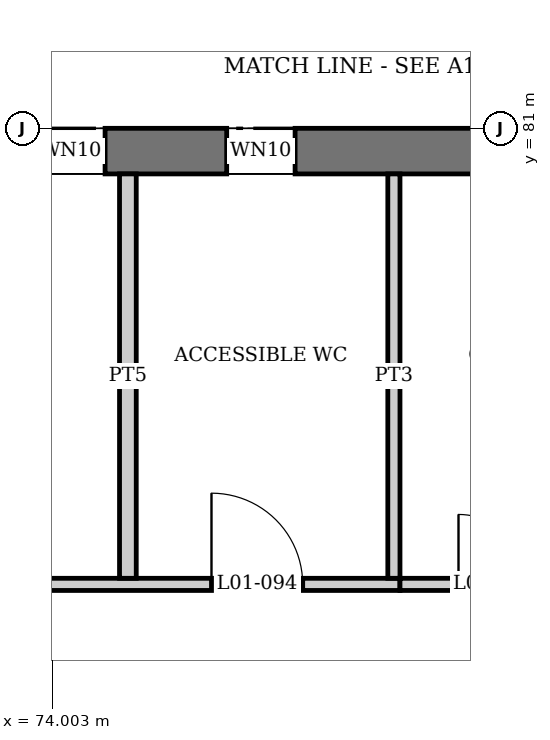
"""IFC4 building model, lengths in metres.
Left out: names, types, materials, properties, quantities, classifications, styles, units other than length and angle.
Written with IfcOpenShell. Run it as: python <this file> out.ifc"""

import sys

from ifc_helpers import new_model, si_unit, direction, frame, frame_2d, origin, place, context, subcontext, project, spatial, rectangle, extrude, element, fill, save


model = new_model("IFC4")
c1 = context("Model", 3, precision=1e-05, world=origin(), true_north=direction((0.0, 1.0)))
c2 = subcontext(c1, "Body", "Model", "MODEL_VIEW")
j1 = project(units=[si_unit("LENGTHUNIT", "METRE"), si_unit("PLANEANGLEUNIT", "RADIAN")], contexts=[c1])
p1 = place(None, origin())
s1 = spatial("IfcSite", under=j1, at=p1, CompositionType="ELEMENT")
p2 = place(p1, origin())
s2 = spatial("IfcBuilding", under=s1, at=p2, CompositionType="ELEMENT")
p3 = place(p2, frame((0.0, 0.0, 6.0)))
s3 = spatial("IfcBuildingStorey", under=s2, at=p3, CompositionType="ELEMENT", Elevation=6.0)
p4 = place(p3, frame((0.0, 80.7, 0.0), z_axis=(0.0, 0.0, 1.0), x_axis=(1.0, 0.0, 0.0)))
e1 = element("IfcWall", 1, at=p4, inside=s3, PredefinedType="SHEAR", context=c2, shape_type="SweptSolid", body=[
    extrude(rectangle(XDim=180.0, YDim=0.6, at=frame_2d((90.0, 0.0))), origin(), (0.0, 0.0, 1.0), 4.5),
])
p5 = place(p4, frame((0.9, 0.0, 0.6)))
e2 = element("IfcOpeningElement", 2, at=p5, cuts=e1, PredefinedType="OPENING", context=c2, shape_type="SweptSolid", body=[
    extrude(rectangle(XDim=2.7, YDim=2.7, at=frame_2d((1.35, 1.35))), frame((0.0, 0.31, 0.0), z_axis=(0.0, -1.0, 0.0), x_axis=(1.0, 0.0, 0.0)), (0.0, 0.0, 1.0), 0.62),
])
p6 = place(p4, frame((5.4, 0.0, 0.6)))
e3 = element("IfcOpeningElement", 3, at=p6, cuts=e1, PredefinedType="OPENING", context=c2, shape_type="SweptSolid", body=[
    extrude(rectangle(XDim=2.7, YDim=2.7, at=frame_2d((1.35, 1.35))), frame((0.0, 0.31, 0.0), z_axis=(0.0, -1.0, 0.0), x_axis=(1.0, 0.0, 0.0)), (0.0, 0.0, 1.0), 0.62),
])
p7 = place(p4, frame((9.9, 0.0, 0.6)))
e4 = element("IfcOpeningElement", 4, at=p7, cuts=e1, PredefinedType="OPENING", context=c2, shape_type="SweptSolid", body=[
    extrude(rectangle(XDim=2.7, YDim=2.7, at=frame_2d((1.35, 1.35))), frame((0.0, 0.31, 0.0), z_axis=(0.0, -1.0, 0.0), x_axis=(1.0, 0.0, 0.0)), (0.0, 0.0, 1.0), 0.62),
])
p8 = place(p4, frame((14.4, 0.0, 0.6)))
e5 = element("IfcOpeningElement", 5, at=p8, cuts=e1, PredefinedType="OPENING", context=c2, shape_type="SweptSolid", body=[
    extrude(rectangle(XDim=2.7, YDim=2.7, at=frame_2d((1.35, 1.35))), frame((0.0, 0.31, 0.0), z_axis=(0.0, -1.0, 0.0), x_axis=(1.0, 0.0, 0.0)), (0.0, 0.0, 1.0), 0.62),
])
p9 = place(p4, frame((18.9, 0.0, 0.6)))
e6 = element("IfcOpeningElement", 6, at=p9, cuts=e1, PredefinedType="OPENING", context=c2, shape_type="SweptSolid", body=[
    extrude(rectangle(XDim=2.7, YDim=2.7, at=frame_2d((1.35, 1.35))), frame((0.0, 0.31, 0.0), z_axis=(0.0, -1.0, 0.0), x_axis=(1.0, 0.0, 0.0)), (0.0, 0.0, 1.0), 0.62),
])
p10 = place(p4, frame((23.4, 0.0, 0.6)))
e7 = element("IfcOpeningElement", 7, at=p10, cuts=e1, PredefinedType="OPENING", context=c2, shape_type="SweptSolid", body=[
    extrude(rectangle(XDim=2.7, YDim=2.7, at=frame_2d((1.35, 1.35))), frame((0.0, 0.31, 0.0), z_axis=(0.0, -1.0, 0.0), x_axis=(1.0, 0.0, 0.0)), (0.0, 0.0, 1.0), 0.62),
])
p11 = place(p4, frame((37.05, 0.0, 0.9)))
e8 = element("IfcOpeningElement", 8, at=p11, cuts=e1, PredefinedType="OPENING", context=c2, shape_type="SweptSolid", body=[
    extrude(rectangle(XDim=2.4, YDim=2.1, at=frame_2d((1.2, 1.05))), frame((0.0, 0.31, 0.0), z_axis=(0.0, -1.0, 0.0), x_axis=(1.0, 0.0, 0.0)), (0.0, 0.0, 1.0), 0.62),
])
p12 = place(p4, frame((41.55, 0.0, 0.9)))
e9 = element("IfcOpeningElement", 9, at=p12, cuts=e1, PredefinedType="OPENING", context=c2, shape_type="SweptSolid", body=[
    extrude(rectangle(XDim=2.4, YDim=2.1, at=frame_2d((1.2, 1.05))), frame((0.0, 0.31, 0.0), z_axis=(0.0, -1.0, 0.0), x_axis=(1.0, 0.0, 0.0)), (0.0, 0.0, 1.0), 0.62),
])
p13 = place(p4, frame((46.05, 0.0, 0.9)))
e10 = element("IfcOpeningElement", 10, at=p13, cuts=e1, PredefinedType="OPENING", context=c2, shape_type="SweptSolid", body=[
    extrude(rectangle(XDim=2.4, YDim=2.1, at=frame_2d((1.2, 1.05))), frame((0.0, 0.31, 0.0), z_axis=(0.0, -1.0, 0.0), x_axis=(1.0, 0.0, 0.0)), (0.0, 0.0, 1.0), 0.62),
])
p14 = place(p4, frame((50.55, 0.0, 0.9)))
e11 = element("IfcOpeningElement", 11, at=p14, cuts=e1, PredefinedType="OPENING", context=c2, shape_type="SweptSolid", body=[
    extrude(rectangle(XDim=2.4, YDim=2.1, at=frame_2d((1.2, 1.05))), frame((0.0, 0.31, 0.0), z_axis=(0.0, -1.0, 0.0), x_axis=(1.0, 0.0, 0.0)), (0.0, 0.0, 1.0), 0.62),
])
p15 = place(p4, frame((55.05, 0.0, 0.9)))
e12 = element("IfcOpeningElement", 12, at=p15, cuts=e1, PredefinedType="OPENING", context=c2, shape_type="SweptSolid", body=[
    extrude(rectangle(XDim=2.4, YDim=2.1, at=frame_2d((1.2, 1.05))), frame((0.0, 0.31, 0.0), z_axis=(0.0, -1.0, 0.0), x_axis=(1.0, 0.0, 0.0)), (0.0, 0.0, 1.0), 0.62),
])
p16 = place(p4, frame((59.55, 0.0, 0.9)))
e13 = element("IfcOpeningElement", 13, at=p16, cuts=e1, PredefinedType="OPENING", context=c2, shape_type="SweptSolid", body=[
    extrude(rectangle(XDim=2.4, YDim=2.1, at=frame_2d((1.2, 1.05))), frame((0.0, 0.31, 0.0), z_axis=(0.0, -1.0, 0.0), x_axis=(1.0, 0.0, 0.0)), (0.0, 0.0, 1.0), 0.62),
])
p17 = place(p4, frame((64.8, 0.0, 1.7)))
e14 = element("IfcOpeningElement", 14, at=p17, cuts=e1, PredefinedType="OPENING", context=c2, shape_type="SweptSolid", body=[
    extrude(rectangle(XDim=0.9, YDim=0.6, at=frame_2d((0.45, 0.3))), frame((0.0, 0.31, 0.0), z_axis=(0.0, -1.0, 0.0), x_axis=(1.0, 0.0, 0.0)), (0.0, 0.0, 1.0), 0.62),
])
p18 = place(p4, frame((69.3, 0.0, 1.7)))
e15 = element("IfcOpeningElement", 15, at=p18, cuts=e1, PredefinedType="OPENING", context=c2, shape_type="SweptSolid", body=[
    extrude(rectangle(XDim=0.9, YDim=0.6, at=frame_2d((0.45, 0.3))), frame((0.0, 0.31, 0.0), z_axis=(0.0, -1.0, 0.0), x_axis=(1.0, 0.0, 0.0)), (0.0, 0.0, 1.0), 0.62),
])
p19 = place(p4, frame((73.8, 0.0, 1.7)))
e16 = element("IfcOpeningElement", 16, at=p19, cuts=e1, PredefinedType="OPENING", context=c2, shape_type="SweptSolid", body=[
    extrude(rectangle(XDim=0.9, YDim=0.6, at=frame_2d((0.45, 0.3))), frame((0.0, 0.31, 0.0), z_axis=(0.0, -1.0, 0.0), x_axis=(1.0, 0.0, 0.0)), (0.0, 0.0, 1.0), 0.62),
])
p20 = place(p4, frame((90.9, 0.0, 0.6)))
e17 = element("IfcOpeningElement", 17, at=p20, cuts=e1, PredefinedType="OPENING", context=c2, shape_type="SweptSolid", body=[
    extrude(rectangle(XDim=2.7, YDim=2.7, at=frame_2d((1.35, 1.35))), frame((0.0, 0.31, 0.0), z_axis=(0.0, -1.0, 0.0), x_axis=(1.0, 0.0, 0.0)), (0.0, 0.0, 1.0), 0.62),
])
p21 = place(p4, frame((95.4, 0.0, 0.6)))
e18 = element("IfcOpeningElement", 18, at=p21, cuts=e1, PredefinedType="OPENING", context=c2, shape_type="SweptSolid", body=[
    extrude(rectangle(XDim=2.7, YDim=2.7, at=frame_2d((1.35, 1.35))), frame((0.0, 0.31, 0.0), z_axis=(0.0, -1.0, 0.0), x_axis=(1.0, 0.0, 0.0)), (0.0, 0.0, 1.0), 0.62),
])
p22 = place(p4, frame((100.8, 0.0, 1.7)))
e19 = element("IfcOpeningElement", 19, at=p22, cuts=e1, PredefinedType="OPENING", context=c2, shape_type="SweptSolid", body=[
    extrude(rectangle(XDim=0.9, YDim=0.6, at=frame_2d((0.45, 0.3))), frame((0.0, 0.31, 0.0), z_axis=(0.0, -1.0, 0.0), x_axis=(1.0, 0.0, 0.0)), (0.0, 0.0, 1.0), 0.62),
])
p23 = place(p4, frame((105.3, 0.0, 1.7)))
e20 = element("IfcOpeningElement", 20, at=p23, cuts=e1, PredefinedType="OPENING", context=c2, shape_type="SweptSolid", body=[
    extrude(rectangle(XDim=0.9, YDim=0.6, at=frame_2d((0.45, 0.3))), frame((0.0, 0.31, 0.0), z_axis=(0.0, -1.0, 0.0), x_axis=(1.0, 0.0, 0.0)), (0.0, 0.0, 1.0), 0.62),
])
p24 = place(p4, frame((109.8, 0.0, 1.7)))
e21 = element("IfcOpeningElement", 21, at=p24, cuts=e1, PredefinedType="OPENING", context=c2, shape_type="SweptSolid", body=[
    extrude(rectangle(XDim=0.9, YDim=0.6, at=frame_2d((0.45, 0.3))), frame((0.0, 0.31, 0.0), z_axis=(0.0, -1.0, 0.0), x_axis=(1.0, 0.0, 0.0)), (0.0, 0.0, 1.0), 0.62),
])
p25 = place(p4, frame((154.05, 0.0, 0.9)))
e22 = element("IfcOpeningElement", 22, at=p25, cuts=e1, PredefinedType="OPENING", context=c2, shape_type="SweptSolid", body=[
    extrude(rectangle(XDim=2.4, YDim=2.1, at=frame_2d((1.2, 1.05))), frame((0.0, 0.31, 0.0), z_axis=(0.0, -1.0, 0.0), x_axis=(1.0, 0.0, 0.0)), (0.0, 0.0, 1.0), 0.62),
])
p26 = place(p4, frame((158.55, 0.0, 0.9)))
e23 = element("IfcOpeningElement", 23, at=p26, cuts=e1, PredefinedType="OPENING", context=c2, shape_type="SweptSolid", body=[
    extrude(rectangle(XDim=2.4, YDim=2.1, at=frame_2d((1.2, 1.05))), frame((0.0, 0.31, 0.0), z_axis=(0.0, -1.0, 0.0), x_axis=(1.0, 0.0, 0.0)), (0.0, 0.0, 1.0), 0.62),
])
p27 = place(p4, frame((163.8, 0.0, 1.7)))
e24 = element("IfcOpeningElement", 24, at=p27, cuts=e1, PredefinedType="OPENING", context=c2, shape_type="SweptSolid", body=[
    extrude(rectangle(XDim=0.9, YDim=0.6, at=frame_2d((0.45, 0.3))), frame((0.0, 0.31, 0.0), z_axis=(0.0, -1.0, 0.0), x_axis=(1.0, 0.0, 0.0)), (0.0, 0.0, 1.0), 0.62),
])
p28 = place(p4, frame((168.3, 0.0, 1.7)))
e25 = element("IfcOpeningElement", 25, at=p28, cuts=e1, PredefinedType="OPENING", context=c2, shape_type="SweptSolid", body=[
    extrude(rectangle(XDim=0.9, YDim=0.6, at=frame_2d((0.45, 0.3))), frame((0.0, 0.31, 0.0), z_axis=(0.0, -1.0, 0.0), x_axis=(1.0, 0.0, 0.0)), (0.0, 0.0, 1.0), 0.62),
])
p29 = place(p4, frame((71.55, 0.0, 1.7)))
e26 = element("IfcOpeningElement", 26, at=p29, cuts=e1, PredefinedType="OPENING", context=c2, shape_type="SweptSolid", body=[
    extrude(rectangle(XDim=0.9, YDim=0.6, at=frame_2d((0.45, 0.3))), frame((0.0, 0.31, 0.0), z_axis=(0.0, -1.0, 0.0), x_axis=(1.0, 0.0, 0.0)), (0.0, 0.0, 1.0), 0.62),
])
p30 = place(p4, frame((76.3, 0.0, 1.7)))
e27 = element("IfcOpeningElement", 27, at=p30, cuts=e1, PredefinedType="OPENING", context=c2, shape_type="SweptSolid", body=[
    extrude(rectangle(XDim=0.9, YDim=0.6, at=frame_2d((0.45, 0.3))), frame((0.0, 0.31, 0.0), z_axis=(0.0, -1.0, 0.0), x_axis=(1.0, 0.0, 0.0)), (0.0, 0.0, 1.0), 0.62),
])
p31 = place(p4, frame((107.55, 0.0, 1.7)))
e28 = element("IfcOpeningElement", 28, at=p31, cuts=e1, PredefinedType="OPENING", context=c2, shape_type="SweptSolid", body=[
    extrude(rectangle(XDim=0.9, YDim=0.6, at=frame_2d((0.45, 0.3))), frame((0.0, 0.31, 0.0), z_axis=(0.0, -1.0, 0.0), x_axis=(1.0, 0.0, 0.0)), (0.0, 0.0, 1.0), 0.62),
])
p32 = place(p4, frame((112.3, 0.0, 1.7)))
e29 = element("IfcOpeningElement", 29, at=p32, cuts=e1, PredefinedType="OPENING", context=c2, shape_type="SweptSolid", body=[
    extrude(rectangle(XDim=0.9, YDim=0.6, at=frame_2d((0.45, 0.3))), frame((0.0, 0.31, 0.0), z_axis=(0.0, -1.0, 0.0), x_axis=(1.0, 0.0, 0.0)), (0.0, 0.0, 1.0), 0.62),
])
p33 = place(p4, frame((166.05, 0.0, 1.7)))
e30 = element("IfcOpeningElement", 30, at=p33, cuts=e1, PredefinedType="OPENING", context=c2, shape_type="SweptSolid", body=[
    extrude(rectangle(XDim=0.9, YDim=0.6, at=frame_2d((0.45, 0.3))), frame((0.0, 0.31, 0.0), z_axis=(0.0, -1.0, 0.0), x_axis=(1.0, 0.0, 0.0)), (0.0, 0.0, 1.0), 0.62),
])
p34 = place(p3, frame((62.9, 75.0, 0.0), z_axis=(0.0, 0.0, 1.0), x_axis=(1.0, 0.0, 0.0)))
e31 = element("IfcWall", 31, at=p34, inside=s3, PredefinedType="PARTITIONING", context=c2, shape_type="SweptSolid", body=[
    extrude(rectangle(XDim=15.68, YDim=0.16, at=frame_2d((7.84, 0.0))), origin(), (0.0, 0.0, 1.0), 3.998),
])
p35 = place(p34, frame((2.7, 0.0, 0.0)))
e32 = element("IfcOpeningElement", 32, at=p35, cuts=e31, PredefinedType="OPENING", context=c2, shape_type="SweptSolid", body=[
    extrude(rectangle(XDim=1.0, YDim=2.1, at=frame_2d((0.5, 1.05))), frame((0.0, 0.09, 0.0), z_axis=(0.0, -1.0, 0.0), x_axis=(1.0, 0.0, 0.0)), (0.0, 0.0, 1.0), 0.18),
])
p36 = place(p34, frame((8.7, 0.0, 0.0)))
e33 = element("IfcOpeningElement", 33, at=p36, cuts=e31, PredefinedType="OPENING", context=c2, shape_type="SweptSolid", body=[
    extrude(rectangle(XDim=1.0, YDim=2.1, at=frame_2d((0.5, 1.05))), frame((0.0, 0.09, 0.0), z_axis=(0.0, -1.0, 0.0), x_axis=(1.0, 0.0, 0.0)), (0.0, 0.0, 1.0), 0.18),
])
p37 = place(p34, frame((13.2, 0.0, 0.0)))
e34 = element("IfcOpeningElement", 34, at=p37, cuts=e31, PredefinedType="OPENING", context=c2, shape_type="SweptSolid", body=[
    extrude(rectangle(XDim=1.2, YDim=2.1, at=frame_2d((0.6, 1.05))), frame((0.0, 0.09, 0.0), z_axis=(0.0, -1.0, 0.0), x_axis=(1.0, 0.0, 0.0)), (0.0, 0.0, 1.0), 0.18),
])
p38 = place(p3, frame((78.58, 75.0, 0.0), z_axis=(0.0, 0.0, 1.0), x_axis=(1.0, 0.0, 0.0)))
e35 = element("IfcWall", 35, at=p38, inside=s3, PredefinedType="PARTITIONING", context=c2, shape_type="SweptSolid", body=[
    extrude(rectangle(XDim=2.42, YDim=0.16, at=frame_2d((1.21, 0.0))), origin(), (0.0, 0.0, 1.0), 4.35),
])
p39 = place(p38, frame((0.77, 0.0, 0.0)))
e36 = element("IfcOpeningElement", 36, at=p39, cuts=e35, PredefinedType="OPENING", context=c2, shape_type="SweptSolid", body=[
    extrude(rectangle(XDim=0.92, YDim=2.1, at=frame_2d((0.46, 1.05))), frame((0.0, 0.09, 0.0), z_axis=(0.0, -1.0, 0.0), x_axis=(1.0, 0.0, 0.0)), (0.0, 0.0, 1.0), 0.18),
])
p40 = place(p3, frame((75.0, 75.08, 0.0), z_axis=(0.0, 0.0, 1.0), x_axis=(0.0, 1.0, 0.0)))
e37 = element("IfcWall", 37, at=p40, inside=s3, PredefinedType="PLUMBINGWALL", context=c2, shape_type="SweptSolid", body=[
    extrude(rectangle(XDim=5.32, YDim=0.22, at=frame_2d((2.66, 0.0))), origin(), (0.0, 0.0, 1.0), 4.35),
])
p41 = place(p3, frame((78.5, 75.08, 0.0), z_axis=(0.0, 0.0, 1.0), x_axis=(0.0, 1.0, 0.0)))
e38 = element("IfcWall", 38, at=p41, inside=s3, PredefinedType="PARTITIONING", context=c2, shape_type="SweptSolid", body=[
    extrude(rectangle(XDim=5.32, YDim=0.16, at=frame_2d((2.66, 0.0))), origin(), (0.0, 0.0, 1.0), 4.35),
])
p42 = place(p19, origin())
e39 = element("IfcWindow", 39, at=p42, inside=s3, PartitioningType="SINGLE_PANEL", PredefinedType="WINDOW", context=c2, shape_type="SweptSolid", body=[
    extrude(rectangle(XDim=0.9, YDim=0.6, at=frame_2d((0.45, 0.3))), frame((0.0, 0.03, 0.0), z_axis=(0.0, -1.0, 0.0), x_axis=(1.0, 0.0, 0.0)), (0.0, 0.0, 1.0), 0.06),
])
fill(e16, e39)
p43 = place(p30, origin())
e40 = element("IfcWindow", 40, at=p43, inside=s3, PartitioningType="SINGLE_PANEL", PredefinedType="WINDOW", context=c2, shape_type="SweptSolid", body=[
    extrude(rectangle(XDim=0.9, YDim=0.6, at=frame_2d((0.45, 0.3))), frame((0.0, 0.03, 0.0), z_axis=(0.0, -1.0, 0.0), x_axis=(1.0, 0.0, 0.0)), (0.0, 0.0, 1.0), 0.06),
])
fill(e27, e40)
p44 = place(p37, origin())
e41 = element("IfcDoor", 41, at=p44, inside=s3, OperationType="SINGLE_SWING_LEFT", PredefinedType="DOOR", context=c2, shape_type="SweptSolid", body=[
    extrude(rectangle(XDim=1.2, YDim=2.1, at=frame_2d((0.6, 1.05))), frame((0.0, 0.025, 0.0), z_axis=(0.0, -1.0, 0.0), x_axis=(1.0, 0.0, 0.0)), (0.0, 0.0, 1.0), 0.05),
])
fill(e34, e41)
p45 = place(p39, origin())
e42 = element("IfcDoor", 42, at=p45, inside=s3, OperationType="SINGLE_SWING_LEFT", PredefinedType="DOOR", context=c2, shape_type="SweptSolid", body=[
    extrude(rectangle(XDim=0.92, YDim=2.1, at=frame_2d((0.46, 1.05))), frame((0.0, 0.025, 0.0), z_axis=(0.0, -1.0, 0.0), x_axis=(1.0, 0.0, 0.0)), (0.0, 0.0, 1.0), 0.05),
])
fill(e36, e42)
save(model, sys.argv[1])
